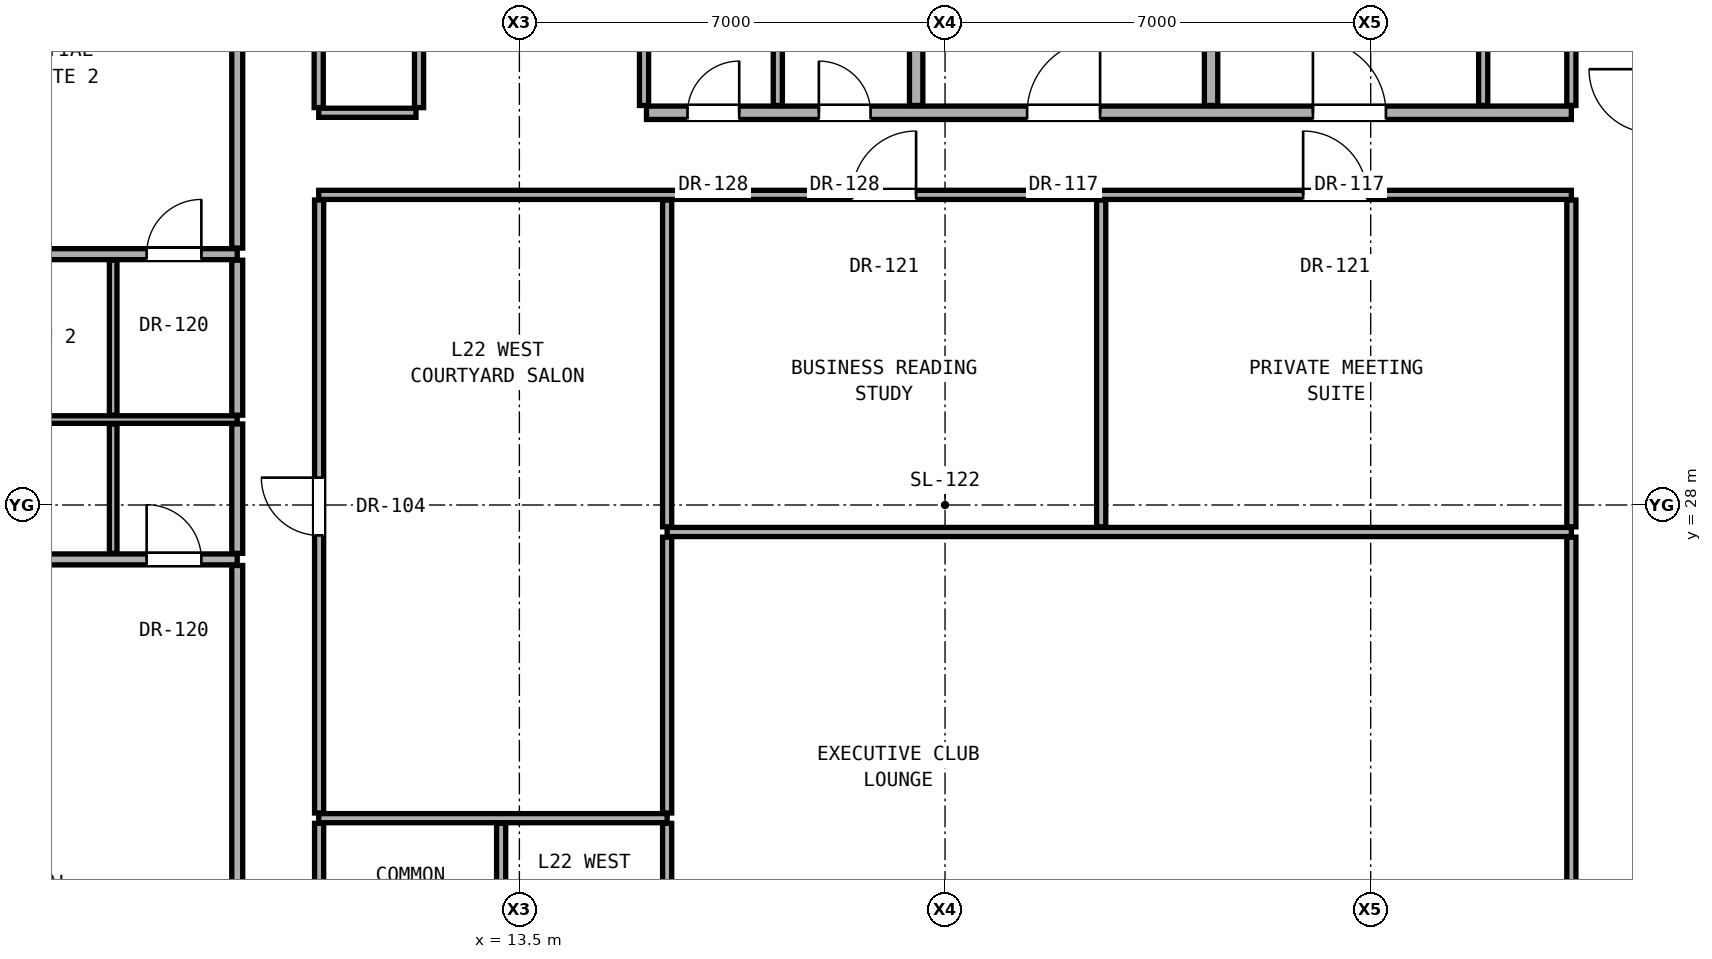
"""IFC4 building model, lengths in metres.
Left out: names, types, materials, properties, quantities, classifications, styles, units other than length and angle.
Written with IfcOpenShell. Run it as: python <this file> out.ifc"""

import sys

from ifc_helpers import new_model, si_unit, direction, frame, frame_2d, origin, place, context, subcontext, project, spatial, rectangle, extrude, element, fill, save


model = new_model("IFC4")
c1 = context("Model", 3, precision=1e-05, world=origin(), true_north=direction((0.0, 1.0)))
c2 = subcontext(c1, "Body", "Model", "MODEL_VIEW")
j1 = project(units=[si_unit("LENGTHUNIT", "METRE"), si_unit("PLANEANGLEUNIT", "RADIAN")], contexts=[c1])
p1 = place(None, origin())
s1 = spatial("IfcSite", under=j1, at=p1, CompositionType="ELEMENT")
p2 = place(p1, origin())
s2 = spatial("IfcBuilding", under=s1, at=p2, CompositionType="ELEMENT")
p3 = place(p2, frame((0.0, 0.0, 78.5)))
s3 = spatial("IfcBuildingStorey", under=s2, at=p3, CompositionType="ELEMENT", Elevation=78.5)
p4 = place(p3, frame((10.2, 22.85, 0.0), z_axis=(0.0, 0.0, 1.0), x_axis=(1.0, 0.0, 0.0)))
e1 = element("IfcWall", 1, at=p4, inside=s3, PredefinedType="PARTITIONING", context=c2, shape_type="SweptSolid", body=[
    extrude(rectangle(XDim=5.73, YDim=0.15, at=frame_2d((2.865, 0.0))), origin(), (0.0, 0.0, 1.0), 2.316),
])
p5 = place(p3, frame((-2.32, 27.105, 0.0), z_axis=(0.0, 0.0, 1.0), x_axis=(1.0, 0.0, 0.0)))
e2 = element("IfcWall", 2, at=p5, inside=s3, PredefinedType="PARTITIONING", context=c2, shape_type="SweptSolid", body=[
    extrude(rectangle(XDim=11.18, YDim=0.18, at=frame_2d((5.59, 0.0))), origin(), (0.0, 0.0, 1.0), 2.159),
])
p6 = place(p5, frame((4.165, 0.0, 0.0)))
e3 = element("IfcOpeningElement", 3, at=p6, cuts=e2, PredefinedType="OPENING", context=c2, shape_type="SweptSolid", body=[
    extrude(rectangle(XDim=0.85, YDim=2.01, at=frame_2d((0.425, 1.005))), frame((0.0, 0.1, 0.0), z_axis=(0.0, -1.0, 0.0), x_axis=(1.0, 0.0, 0.0)), (0.0, 0.0, 1.0), 0.2),
])
p7 = place(p5, frame((9.69, 0.0, 0.0)))
e4 = element("IfcOpeningElement", 4, at=p7, cuts=e2, PredefinedType="OPENING", context=c2, shape_type="SweptSolid", body=[
    extrude(rectangle(XDim=0.9, YDim=2.1, at=frame_2d((0.45, 1.05))), frame((0.0, 0.1, 0.0), z_axis=(0.0, -1.0, 0.0), x_axis=(1.0, 0.0, 0.0)), (0.0, 0.0, 1.0), 0.2),
])
p8 = place(p3, frame((15.93, 27.556, 0.0), z_axis=(0.0, 0.0, 1.0), x_axis=(1.0, 0.0, 0.0)))
e5 = element("IfcWall", 5, at=p8, inside=s3, PredefinedType="PARTITIONING", context=c2, shape_type="SweptSolid", body=[
    extrude(rectangle(XDim=14.87, YDim=0.15, at=frame_2d((7.435, 0.0))), origin(), (0.0, 0.0, 1.0), 2.316),
])
p9 = place(p3, frame((-2.32, 29.405, 0.0), z_axis=(0.0, 0.0, 1.0), x_axis=(1.0, 0.0, 0.0)))
e6 = element("IfcWall", 6, at=p9, inside=s3, PredefinedType="PARTITIONING", context=c2, shape_type="SweptSolid", body=[
    extrude(rectangle(XDim=11.18, YDim=0.125, at=frame_2d((5.59, 0.0))), origin(), (0.0, 0.0, 1.0), 2.159),
])
p10 = place(p3, frame((-2.32, 32.125, 0.0), z_axis=(0.0, 0.0, 1.0), x_axis=(1.0, 0.0, 0.0)))
e7 = element("IfcWall", 7, at=p10, inside=s3, PredefinedType="PARTITIONING", context=c2, shape_type="SweptSolid", body=[
    extrude(rectangle(XDim=11.18, YDim=0.18, at=frame_2d((5.59, 0.0))), origin(), (0.0, 0.0, 1.0), 2.159),
])
p11 = place(p10, frame((2.815, 0.0, 0.0)))
e8 = element("IfcOpeningElement", 8, at=p11, cuts=e7, PredefinedType="OPENING", context=c2, shape_type="SweptSolid", body=[
    extrude(rectangle(XDim=0.85, YDim=2.01, at=frame_2d((0.425, 1.005))), frame((0.0, 0.1, 0.0), z_axis=(0.0, -1.0, 0.0), x_axis=(1.0, 0.0, 0.0)), (0.0, 0.0, 1.0), 0.2),
])
p12 = place(p10, frame((9.69, 0.0, 0.0)))
e9 = element("IfcOpeningElement", 9, at=p12, cuts=e7, PredefinedType="OPENING", context=c2, shape_type="SweptSolid", body=[
    extrude(rectangle(XDim=0.9, YDim=2.1, at=frame_2d((0.45, 1.05))), frame((0.0, 0.1, 0.0), z_axis=(0.0, -1.0, 0.0), x_axis=(1.0, 0.0, 0.0)), (0.0, 0.0, 1.0), 0.2),
])
p13 = place(p3, frame((10.2, 33.1, 0.0), z_axis=(0.0, 0.0, 1.0), x_axis=(1.0, 0.0, 0.0)))
e10 = element("IfcWall", 10, at=p13, inside=s3, PredefinedType="PARTITIONING", context=c2, shape_type="SweptSolid", body=[
    extrude(rectangle(XDim=20.6, YDim=0.15, at=frame_2d((10.3, 0.0))), origin(), (0.0, 0.0, 1.0), 2.316),
])
p14 = place(p13, frame((8.774, 0.0, 0.0)))
e11 = element("IfcOpeningElement", 11, at=p14, cuts=e10, PredefinedType="OPENING", context=c2, shape_type="SweptSolid", body=[
    extrude(rectangle(XDim=1.05, YDim=2.2, at=frame_2d((0.525, 1.1))), frame((0.0, 0.085, 0.0), z_axis=(0.0, -1.0, 0.0), x_axis=(1.0, 0.0, 0.0)), (0.0, 0.0, 1.0), 0.17),
])
p15 = place(p13, frame((16.189, 0.0, 0.0)))
e12 = element("IfcOpeningElement", 12, at=p15, cuts=e10, PredefinedType="OPENING", context=c2, shape_type="SweptSolid", body=[
    extrude(rectangle(XDim=1.05, YDim=2.2, at=frame_2d((0.525, 1.1))), frame((0.0, 0.085, 0.0), z_axis=(0.0, -1.0, 0.0), x_axis=(1.0, 0.0, 0.0)), (0.0, 0.0, 1.0), 0.17),
])
p16 = place(p3, frame((10.2, 34.45, 0.0), z_axis=(0.0, 0.0, 1.0), x_axis=(1.0, 0.0, 0.0)))
e13 = element("IfcWall", 13, at=p16, inside=s3, PredefinedType="PARTITIONING", context=c2, shape_type="SweptSolid", body=[
    extrude(rectangle(XDim=1.6, YDim=0.15, at=frame_2d((0.8, 0.0))), origin(), (0.0, 0.0, 1.0), 2.316),
])
p17 = place(p3, frame((15.59, 34.45, 0.0), z_axis=(0.0, 0.0, 1.0), x_axis=(1.0, 0.0, 0.0)))
e14 = element("IfcWall", 14, at=p17, inside=s3, PredefinedType="SOLIDWALL", context=c2, shape_type="SweptSolid", body=[
    extrude(rectangle(XDim=15.21, YDim=0.22, at=frame_2d((7.605, 0.0))), origin(), (0.0, 0.0, 1.0), 2.316),
])
p18 = place(p17, frame((6.26, 0.0, 0.0)))
e15 = element("IfcOpeningElement", 15, at=p18, cuts=e14, PredefinedType="OPENING", context=c2, shape_type="SweptSolid", body=[
    extrude(rectangle(XDim=1.2, YDim=2.25, at=frame_2d((0.6, 1.125))), frame((0.0, 0.12, 0.0), z_axis=(0.0, -1.0, 0.0), x_axis=(1.0, 0.0, 0.0)), (0.0, 0.0, 1.0), 0.24),
])
p19 = place(p17, frame((10.96, 0.0, 0.0)))
e16 = element("IfcOpeningElement", 16, at=p19, cuts=e14, PredefinedType="OPENING", context=c2, shape_type="SweptSolid", body=[
    extrude(rectangle(XDim=1.2, YDim=2.25, at=frame_2d((0.6, 1.125))), frame((0.0, 0.12, 0.0), z_axis=(0.0, -1.0, 0.0), x_axis=(1.0, 0.0, 0.0)), (0.0, 0.0, 1.0), 0.24),
])
p20 = place(p17, frame((0.675, 0.0, 0.0)))
e17 = element("IfcOpeningElement", 17, at=p20, cuts=e14, PredefinedType="OPENING", context=c2, shape_type="SweptSolid", body=[
    extrude(rectangle(XDim=0.85, YDim=2.01, at=frame_2d((0.425, 1.005))), frame((0.0, 0.12, 0.0), z_axis=(0.0, -1.0, 0.0), x_axis=(1.0, 0.0, 0.0)), (0.0, 0.0, 1.0), 0.24),
])
p21 = place(p17, frame((2.835, 0.0, 0.0)))
e18 = element("IfcOpeningElement", 18, at=p21, cuts=e14, PredefinedType="OPENING", context=c2, shape_type="SweptSolid", body=[
    extrude(rectangle(XDim=0.85, YDim=2.01, at=frame_2d((0.425, 1.005))), frame((0.0, 0.12, 0.0), z_axis=(0.0, -1.0, 0.0), x_axis=(1.0, 0.0, 0.0)), (0.0, 0.0, 1.0), 0.24),
])
p22 = place(p3, frame((6.82, 27.205, 0.0), z_axis=(0.0, 0.0, 1.0), x_axis=(0.0, 1.0, 0.0)))
e19 = element("IfcWall", 19, at=p22, inside=s3, PredefinedType="PARTITIONING", context=c2, shape_type="SweptSolid", body=[
    extrude(rectangle(XDim=2.127, YDim=0.125, at=frame_2d((1.064, 0.0))), origin(), (0.0, 0.0, 1.0), 2.94),
])
p23 = place(p3, frame((6.82, 29.478, 0.0), z_axis=(0.0, 0.0, 1.0), x_axis=(0.0, 1.0, 0.0)))
e20 = element("IfcWall", 20, at=p23, inside=s3, PredefinedType="PARTITIONING", context=c2, shape_type="SweptSolid", body=[
    extrude(rectangle(XDim=2.547, YDim=0.125, at=frame_2d((1.274, 0.0))), origin(), (0.0, 0.0, 1.0), 2.316),
])
p24 = place(p3, frame((8.86, 13.916, 0.0), z_axis=(0.0, 0.0, 1.0), x_axis=(0.0, 1.0, 0.0)))
e21 = element("IfcWall", 21, at=p24, inside=s3, PredefinedType="PARTITIONING", context=c2, shape_type="SweptSolid", body=[
    extrude(rectangle(XDim=13.089, YDim=0.18, at=frame_2d((6.544, 0.0))), origin(), (0.0, 0.0, 1.0), 2.316),
])
p25 = place(p24, frame((6.02, 0.0, 0.0)))
e22 = element("IfcOpeningElement", 22, at=p25, cuts=e21, PredefinedType="OPENING", context=c2, shape_type="SweptSolid", body=[
    extrude(rectangle(XDim=1.05, YDim=2.2, at=frame_2d((0.525, 1.1))), frame((0.0, 0.1, 0.0), z_axis=(0.0, -1.0, 0.0), x_axis=(1.0, 0.0, 0.0)), (0.0, 0.0, 1.0), 0.2),
])
p26 = place(p3, frame((8.86, 27.205, 0.0), z_axis=(0.0, 0.0, 1.0), x_axis=(0.0, 1.0, 0.0)))
e23 = element("IfcWall", 23, at=p26, inside=s3, PredefinedType="PARTITIONING", context=c2, shape_type="SweptSolid", body=[
    extrude(rectangle(XDim=2.127, YDim=0.18, at=frame_2d((1.064, 0.0))), origin(), (0.0, 0.0, 1.0), 2.94),
])
p27 = place(p3, frame((8.86, 29.478, 0.0), z_axis=(0.0, 0.0, 1.0), x_axis=(0.0, 1.0, 0.0)))
e24 = element("IfcWall", 24, at=p27, inside=s3, PredefinedType="PARTITIONING", context=c2, shape_type="SweptSolid", body=[
    extrude(rectangle(XDim=2.547, YDim=0.18, at=frame_2d((1.274, 0.0))), origin(), (0.0, 0.0, 1.0), 2.316),
])
p28 = place(p3, frame((8.86, 32.225, 0.0), z_axis=(0.0, 0.0, 1.0), x_axis=(0.0, 1.0, 0.0)))
e25 = element("IfcWall", 25, at=p28, inside=s3, PredefinedType="PARTITIONING", context=c2, shape_type="SweptSolid", body=[
    extrude(rectangle(XDim=9.859, YDim=0.18, at=frame_2d((4.929, 0.0))), origin(), (0.0, 0.0, 1.0), 2.316),
])
p29 = place(p28, frame((4.405, 0.0, 0.0)))
e26 = element("IfcOpeningElement", 26, at=p29, cuts=e25, PredefinedType="OPENING", context=c2, shape_type="SweptSolid", body=[
    extrude(rectangle(XDim=1.05, YDim=2.2, at=frame_2d((0.525, 1.1))), frame((0.0, 0.1, 0.0), z_axis=(0.0, -1.0, 0.0), x_axis=(1.0, 0.0, 0.0)), (0.0, 0.0, 1.0), 0.2),
])
p30 = place(p3, frame((10.207, 19.985, 0.0), z_axis=(0.0, 0.0, 1.0), x_axis=(0.0, 1.0, 0.0)))
e27 = element("IfcWall", 27, at=p30, inside=s3, PredefinedType="PARTITIONING", context=c2, shape_type="SweptSolid", body=[
    extrude(rectangle(XDim=2.78, YDim=0.15, at=frame_2d((1.39, 0.0))), origin(), (0.0, 0.0, 1.0), 2.94),
])
p31 = place(p3, frame((10.207, 22.935, 0.0), z_axis=(0.0, 0.0, 1.0), x_axis=(0.0, 1.0, 0.0)))
e28 = element("IfcWall", 28, at=p31, inside=s3, PredefinedType="PARTITIONING", context=c2, shape_type="SweptSolid", body=[
    extrude(rectangle(XDim=10.08, YDim=0.15, at=frame_2d((5.04, 0.0))), origin(), (0.0, 0.0, 1.0), 2.316),
])
p32 = place(p31, frame((4.565, 0.0, 0.0)))
e29 = element("IfcOpeningElement", 29, at=p32, cuts=e28, PredefinedType="OPENING", context=c2, shape_type="SweptSolid", body=[
    extrude(rectangle(XDim=0.95, YDim=2.15, at=frame_2d((0.475, 1.075))), frame((0.0, 0.085, 0.0), z_axis=(0.0, -1.0, 0.0), x_axis=(1.0, 0.0, 0.0)), (0.0, 0.0, 1.0), 0.17),
])
p33 = place(p3, frame((10.2, 34.535, 0.0), z_axis=(0.0, 0.0, 1.0), x_axis=(0.0, 1.0, 0.0)))
e30 = element("IfcWall", 30, at=p33, inside=s3, PredefinedType="PARTITIONING", context=c2, shape_type="SweptSolid", body=[
    extrude(rectangle(XDim=9.13, YDim=0.15, at=frame_2d((4.565, 0.0))), origin(), (0.0, 0.0, 1.0), 2.316),
])
p34 = place(p3, frame((11.85, 34.535, 0.0), z_axis=(0.0, 0.0, 1.0), x_axis=(0.0, 1.0, 0.0)))
e31 = element("IfcWall", 31, at=p34, inside=s3, PredefinedType="PARTITIONING", context=c2, shape_type="SweptSolid", body=[
    extrude(rectangle(XDim=2.745, YDim=0.15, at=frame_2d((1.373, 0.0))), origin(), (0.0, 0.0, 1.0), 2.94),
])
p35 = place(p3, frame((13.2, 19.985, 0.0), z_axis=(0.0, 0.0, 1.0), x_axis=(0.0, 1.0, 0.0)))
e32 = element("IfcWall", 32, at=p35, inside=s3, PredefinedType="PARTITIONING", context=c2, shape_type="SweptSolid", body=[
    extrude(rectangle(XDim=2.78, YDim=0.15, at=frame_2d((1.39, 0.0))), origin(), (0.0, 0.0, 1.0), 2.94),
])
p36 = place(p3, frame((15.55, 34.57, 0.0), z_axis=(0.0, 0.0, 1.0), x_axis=(0.0, 1.0, 0.0)))
e33 = element("IfcWall", 33, at=p36, inside=s3, PredefinedType="PARTITIONING", context=c2, shape_type="SweptSolid", body=[
    extrude(rectangle(XDim=2.71, YDim=0.15, at=frame_2d((1.355, 0.0))), origin(), (0.0, 0.0, 1.0), 2.469),
])
p37 = place(p3, frame((15.93, 19.985, 0.0), z_axis=(0.0, 0.0, 1.0), x_axis=(0.0, 1.0, 0.0)))
e34 = element("IfcWall", 34, at=p37, inside=s3, PredefinedType="PARTITIONING", context=c2, shape_type="SweptSolid", body=[
    extrude(rectangle(XDim=2.78, YDim=0.15, at=frame_2d((1.39, 0.0))), origin(), (0.0, 0.0, 1.0), 2.469),
])
p38 = place(p3, frame((15.93, 22.935, 0.0), z_axis=(0.0, 0.0, 1.0), x_axis=(0.0, 1.0, 0.0)))
e35 = element("IfcWall", 35, at=p38, inside=s3, PredefinedType="PARTITIONING", context=c2, shape_type="SweptSolid", body=[
    extrude(rectangle(XDim=4.536, YDim=0.15, at=frame_2d((2.268, 0.0))), origin(), (0.0, 0.0, 1.0), 2.316),
])
p39 = place(p3, frame((15.93, 27.641, 0.0), z_axis=(0.0, 0.0, 1.0), x_axis=(0.0, 1.0, 0.0)))
e36 = element("IfcWall", 36, at=p39, inside=s3, PredefinedType="PARTITIONING", context=c2, shape_type="SweptSolid", body=[
    extrude(rectangle(XDim=5.374, YDim=0.15, at=frame_2d((2.687, 0.0))), origin(), (0.0, 0.0, 1.0), 2.316),
])
p40 = place(p3, frame((17.75, 34.57, 0.0), z_axis=(0.0, 0.0, 1.0), x_axis=(0.0, 1.0, 0.0)))
e37 = element("IfcWall", 37, at=p40, inside=s3, PredefinedType="PARTITIONING", context=c2, shape_type="SweptSolid", body=[
    extrude(rectangle(XDim=2.71, YDim=0.15, at=frame_2d((1.355, 0.0))), origin(), (0.0, 0.0, 1.0), 2.94),
])
p41 = place(p3, frame((20.025, 34.57, 0.0), z_axis=(0.0, 0.0, 1.0), x_axis=(0.0, 1.0, 0.0)))
e38 = element("IfcWall", 38, at=p41, inside=s3, PredefinedType="SOLIDWALL", context=c2, shape_type="SweptSolid", body=[
    extrude(rectangle(XDim=2.71, YDim=0.22, at=frame_2d((1.355, 0.0))), origin(), (0.0, 0.0, 1.0), 2.94),
])
p42 = place(p3, frame((23.068, 27.641, 0.0), z_axis=(0.0, 0.0, 1.0), x_axis=(0.0, 1.0, 0.0)))
e39 = element("IfcWall", 39, at=p42, inside=s3, PredefinedType="PARTITIONING", context=c2, shape_type="SweptSolid", body=[
    extrude(rectangle(XDim=5.374, YDim=0.15, at=frame_2d((2.687, 0.0))), origin(), (0.0, 0.0, 1.0), 2.316),
])
p43 = place(p3, frame((24.875, 34.57, 0.0), z_axis=(0.0, 0.0, 1.0), x_axis=(0.0, 1.0, 0.0)))
e40 = element("IfcWall", 40, at=p43, inside=s3, PredefinedType="SOLIDWALL", context=c2, shape_type="SweptSolid", body=[
    extrude(rectangle(XDim=2.71, YDim=0.22, at=frame_2d((1.355, 0.0))), origin(), (0.0, 0.0, 1.0), 2.94),
])
p44 = place(p3, frame((29.35, 34.57, 0.0), z_axis=(0.0, 0.0, 1.0), x_axis=(0.0, 1.0, 0.0)))
e41 = element("IfcWall", 41, at=p44, inside=s3, PredefinedType="PARTITIONING", context=c2, shape_type="SweptSolid", body=[
    extrude(rectangle(XDim=2.71, YDim=0.15, at=frame_2d((1.355, 0.0))), origin(), (0.0, 0.0, 1.0), 2.94),
])
p45 = place(p3, frame((30.8, 19.985, 0.0), z_axis=(0.0, 0.0, 1.0), x_axis=(0.0, 1.0, 0.0)))
e42 = element("IfcWall", 42, at=p45, inside=s3, PredefinedType="PARTITIONING", context=c2, shape_type="SweptSolid", body=[
    extrude(rectangle(XDim=7.486, YDim=0.15, at=frame_2d((3.743, 0.0))), origin(), (0.0, 0.0, 1.0), 2.316),
])
p46 = place(p3, frame((30.8, 27.641, 0.0), z_axis=(0.0, 0.0, 1.0), x_axis=(0.0, 1.0, 0.0)))
e43 = element("IfcWall", 43, at=p46, inside=s3, PredefinedType="PARTITIONING", context=c2, shape_type="SweptSolid", body=[
    extrude(rectangle(XDim=5.374, YDim=0.15, at=frame_2d((2.687, 0.0))), origin(), (0.0, 0.0, 1.0), 2.316),
])
p47 = place(p3, frame((30.8, 34.57, 0.0), z_axis=(0.0, 0.0, 1.0), x_axis=(0.0, 1.0, 0.0)))
e44 = element("IfcWall", 44, at=p47, inside=s3, PredefinedType="PARTITIONING", context=c2, shape_type="SweptSolid", body=[
    extrude(rectangle(XDim=9.095, YDim=0.15, at=frame_2d((4.547, 0.0))), origin(), (0.0, 0.0, 1.0), 2.316),
])
p48 = place(p18, origin())
e45 = element("IfcDoor", 45, at=p48, inside=s3, OperationType="SINGLE_SWING_RIGHT", PredefinedType="DOOR", context=c2, shape_type="SweptSolid", body=[
    extrude(rectangle(XDim=1.2, YDim=2.25, at=frame_2d((0.6, 1.125))), frame((0.0, 0.025, 0.0), z_axis=(0.0, -1.0, 0.0), x_axis=(1.0, 0.0, 0.0)), (0.0, 0.0, 1.0), 0.05),
])
fill(e15, e45)
p49 = place(p19, origin())
e46 = element("IfcDoor", 46, at=p49, inside=s3, OperationType="SINGLE_SWING_LEFT", PredefinedType="DOOR", context=c2, shape_type="SweptSolid", body=[
    extrude(rectangle(XDim=1.2, YDim=2.25, at=frame_2d((0.6, 1.125))), frame((0.0, 0.025, 0.0), z_axis=(0.0, -1.0, 0.0), x_axis=(1.0, 0.0, 0.0)), (0.0, 0.0, 1.0), 0.05),
])
fill(e16, e46)
p50 = place(p20, origin())
e47 = element("IfcDoor", 47, at=p50, inside=s3, OperationType="SINGLE_SWING_RIGHT", PredefinedType="DOOR", context=c2, shape_type="SweptSolid", body=[
    extrude(rectangle(XDim=0.85, YDim=2.01, at=frame_2d((0.425, 1.005))), frame((0.0, 0.025, 0.0), z_axis=(0.0, -1.0, 0.0), x_axis=(1.0, 0.0, 0.0)), (0.0, 0.0, 1.0), 0.05),
])
fill(e17, e47)
p51 = place(p21, origin())
e48 = element("IfcDoor", 48, at=p51, inside=s3, OperationType="SINGLE_SWING_LEFT", PredefinedType="DOOR", context=c2, shape_type="SweptSolid", body=[
    extrude(rectangle(XDim=0.85, YDim=2.01, at=frame_2d((0.425, 1.005))), frame((0.0, 0.025, 0.0), z_axis=(0.0, -1.0, 0.0), x_axis=(1.0, 0.0, 0.0)), (0.0, 0.0, 1.0), 0.05),
])
fill(e18, e48)
p52 = place(p7, origin())
e49 = element("IfcDoor", 49, at=p52, inside=s3, OperationType="SINGLE_SWING_LEFT", PredefinedType="DOOR", context=c2, shape_type="SweptSolid", body=[
    extrude(rectangle(XDim=0.9, YDim=2.1, at=frame_2d((0.45, 1.05))), frame((0.0, 0.025, 0.0), z_axis=(0.0, -1.0, 0.0), x_axis=(1.0, 0.0, 0.0)), (0.0, 0.0, 1.0), 0.05),
])
fill(e4, e49)
p53 = place(p12, origin())
e50 = element("IfcDoor", 50, at=p53, inside=s3, OperationType="SINGLE_SWING_RIGHT", PredefinedType="DOOR", context=c2, shape_type="SweptSolid", body=[
    extrude(rectangle(XDim=0.9, YDim=2.1, at=frame_2d((0.45, 1.05))), frame((0.0, 0.025, 0.0), z_axis=(0.0, -1.0, 0.0), x_axis=(1.0, 0.0, 0.0)), (0.0, 0.0, 1.0), 0.05),
])
fill(e9, e50)
p54 = place(p32, origin())
e51 = element("IfcDoor", 51, at=p54, inside=s3, OperationType="SINGLE_SWING_RIGHT", PredefinedType="DOOR", context=c2, shape_type="SweptSolid", body=[
    extrude(rectangle(XDim=0.95, YDim=2.15, at=frame_2d((0.475, 1.075))), frame((0.0, 0.025, 0.0), z_axis=(0.0, -1.0, 0.0), x_axis=(1.0, 0.0, 0.0)), (0.0, 0.0, 1.0), 0.05),
])
fill(e29, e51)
p55 = place(p14, origin())
e52 = element("IfcDoor", 52, at=p55, inside=s3, OperationType="SINGLE_SWING_RIGHT", PredefinedType="DOOR", context=c2, shape_type="SweptSolid", body=[
    extrude(rectangle(XDim=1.05, YDim=2.2, at=frame_2d((0.525, 1.1))), frame((0.0, 0.025, 0.0), z_axis=(0.0, -1.0, 0.0), x_axis=(1.0, 0.0, 0.0)), (0.0, 0.0, 1.0), 0.05),
])
fill(e11, e52)
p56 = place(p15, origin())
e53 = element("IfcDoor", 53, at=p56, inside=s3, OperationType="SINGLE_SWING_LEFT", PredefinedType="DOOR", context=c2, shape_type="SweptSolid", body=[
    extrude(rectangle(XDim=1.05, YDim=2.2, at=frame_2d((0.525, 1.1))), frame((0.0, 0.025, 0.0), z_axis=(0.0, -1.0, 0.0), x_axis=(1.0, 0.0, 0.0)), (0.0, 0.0, 1.0), 0.05),
])
fill(e12, e53)
save(model, sys.argv[1])
